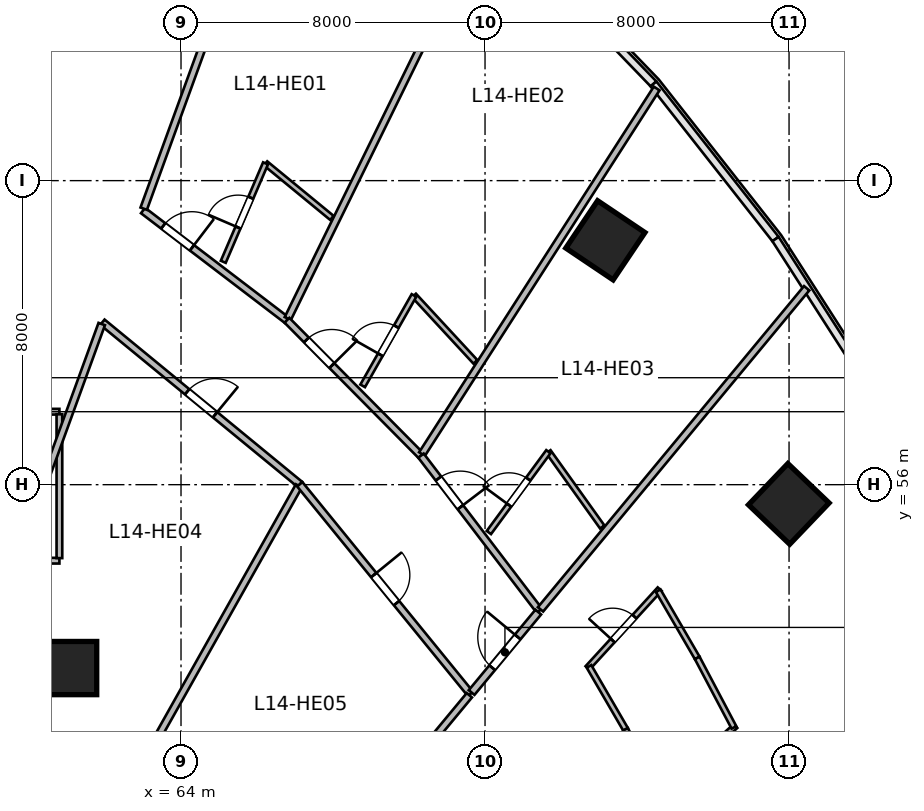
"""IFC4 building model, lengths in metres.
Left out: names, types, materials, properties, quantities, classifications, styles, units other than length and angle.
Written with IfcOpenShell. Run it as: python <this file> out.ifc"""

import sys

from ifc_helpers import new_model, si_unit, direction, frame, frame_2d, origin, origin_2d, place, context, subcontext, project, spatial, rectangle, circle, extrude, source, transform, mapped, element, fill, save


model = new_model("IFC4")
c1 = context("Model", 3, precision=1e-05, world=origin(), true_north=direction((0.0, 1.0)))
c2 = subcontext(c1, "Body", "Model", "MODEL_VIEW")
j1 = project(units=[si_unit("LENGTHUNIT", "METRE"), si_unit("PLANEANGLEUNIT", "RADIAN")], contexts=[c1])
p1 = place(None, origin())
s1 = spatial("IfcSite", under=j1, at=p1, CompositionType="ELEMENT")
p2 = place(p1, origin())
s2 = spatial("IfcBuilding", under=s1, at=p2, CompositionType="ELEMENT")
p3 = place(p2, frame((0.0, 0.0, 64.2)))
s3 = spatial("IfcBuildingStorey", under=s2, at=p3, CompositionType="ELEMENT", Elevation=64.2)
m1 = source(origin(), c2, "Body", "SweptSolid", [
    extrude(circle(Radius=0.7, at=origin_2d()), origin(), (0.0, 0.0, 1.0), 3.6),
])
p4 = place(p3, frame((61.082, 51.175, 0.0), z_axis=(0.0, 0.0, 1.0), x_axis=(0.409126902895, 0.912477494148, 0.0)))
e1 = element("IfcColumn", 1, at=p4, inside=s3, PredefinedType="COLUMN", context=c2, shape_type="MappedRepresentation", body=[
    mapped(m1, transform((0.0, 0.0, 0.0), scale=1.0)),
])
m2 = source(origin(), c2, "Body", "SweptSolid", [
    extrude(rectangle(XDim=1.5, YDim=1.5, at=origin_2d()), origin(), (0.0, 0.0, 1.0), 3.6),
])
for number, where, z_axis, x_axis in (
    (2, (75.167, 62.43, 0.0), (0.0, 0.0, 1.0), (0.558, 0.83, 0.0)),
    (3, (79.993, 55.494, 0.0), (0.0, 0.0, 1.0), (0.691, 0.723, 0.0)),
):
    element("IfcColumn", number, at=place(p3, frame(where, z_axis=z_axis, x_axis=x_axis)), inside=s3, PredefinedType="COLUMN", context=c2, shape_type="MappedRepresentation", body=[
        mapped(m2, transform((0.0, 0.0, 0.0), scale=1.0)),
    ])
m3 = source(origin(), c2, "Body", "SweptSolid", [
    extrude(rectangle(XDim=6.6, YDim=0.15, at=frame_2d((3.3, 0.0))), origin(), (0.0, 0.0, 1.0), 2.803),
])
p5 = place(p3, frame((54.2, 54.0, 0.0), z_axis=(0.0, 0.0, 1.0), x_axis=(1.0, 0.0, 0.0)))
e4 = element("IfcWall", 4, at=p5, inside=s3, PredefinedType="PARTITIONING", context=c2, shape_type="MappedRepresentation", body=[
    mapped(m3, transform((0.0, 0.0, 0.0), scale=1.0)),
])
m4 = source(origin(), c2, "Body", "SweptSolid", [
    extrude(rectangle(XDim=6.6, YDim=0.15, at=frame_2d((3.3, 0.0))), origin(), (0.0, 0.0, 1.0), 3.36),
])
p6 = place(p3, frame((54.2, 57.92, 0.0), z_axis=(0.0, 0.0, 1.0), x_axis=(1.0, 0.0, 0.0)))
e5 = element("IfcWall", 5, at=p6, inside=s3, PredefinedType="PARTITIONING", context=c2, shape_type="MappedRepresentation", body=[
    mapped(m4, transform((0.0, 0.0, 0.0), scale=1.0)),
])
p7 = place(p6, frame((2.825, 0.0, 0.0)))
e6 = element("IfcOpeningElement", 6, at=p7, cuts=e5, PredefinedType="OPENING", context=c2, shape_type="SweptSolid", body=[
    extrude(rectangle(XDim=0.95, YDim=2.1, at=frame_2d((0.475, 1.05))), frame((0.0, 0.085, 0.0), z_axis=(0.0, -1.0, 0.0), x_axis=(1.0, 0.0, 0.0)), (0.0, 0.0, 1.0), 0.17),
])
m5 = source(origin(), c2, "Body", "SweptSolid", [
    extrude(rectangle(XDim=3.785, YDim=0.15, at=frame_2d((1.893, 0.0))), origin(), (0.0, 0.0, 1.0), 3.36),
])
p8 = place(p3, frame((60.8, 54.067, 0.0), z_axis=(0.0, 0.0, 1.0), x_axis=(0.0, 1.0, 0.0)))
e7 = element("IfcWall", 7, at=p8, inside=s3, PredefinedType="PARTITIONING", context=c2, shape_type="MappedRepresentation", body=[
    mapped(m5, transform((0.0, 0.0, 0.0), scale=1.0)),
])
m6 = source(origin(), c2, "Body", "SweptSolid", [
    extrude(rectangle(XDim=4.762, YDim=0.18, at=frame_2d((2.381, 0.0))), origin(), (0.0, 0.0, 1.0), 3.36),
])
p9 = place(p3, frame((63.001, 63.214, 0.0), z_axis=(0.0, 0.0, 1.0), x_axis=(0.795070295872, -0.60651729128, 0.0)))
e8 = element("IfcWall", 8, at=p9, inside=s3, PredefinedType="PLUMBINGWALL", context=c2, shape_type="MappedRepresentation", body=[
    mapped(m6, transform((0.0, 0.0, 0.0), scale=1.0)),
])
p10 = place(p9, frame((0.668, 0.0, 0.0)))
e9 = element("IfcOpeningElement", 9, at=p10, cuts=e8, PredefinedType="OPENING", context=c2, shape_type="SweptSolid", body=[
    extrude(rectangle(XDim=0.95, YDim=2.15, at=frame_2d((0.475, 1.075))), frame((0.0, 0.1, 0.0), z_axis=(0.0, -1.0, 0.0), x_axis=(1.0, 0.0, 0.0)), (0.0, 0.0, 1.0), 0.2),
])
m7 = source(origin(), c2, "Body", "SweptSolid", [
    extrude(rectangle(XDim=12.088, YDim=0.18, at=frame_2d((6.044, 0.0))), origin(), (0.0, 0.0, 1.0), 3.36),
])
p11 = place(p3, frame((63.019, 63.262, 0.0), z_axis=(0.0, 0.0, 1.0), x_axis=(0.34203007529, 0.939689005787, 0.0)))
e10 = element("IfcWall", 10, at=p11, inside=s3, PredefinedType="PLUMBINGWALL", context=c2, shape_type="MappedRepresentation", body=[
    mapped(m7, transform((0.0, 0.0, 0.0), scale=1.0)),
])
m8 = source(origin(), c2, "Body", "SweptSolid", [
    extrude(rectangle(XDim=11.775, YDim=0.18, at=frame_2d((5.887, 0.0))), origin(), (0.0, 0.0, 1.0), 3.36),
])
p12 = place(p3, frame((66.81, 60.371, 0.0), z_axis=(0.0, 0.0, 1.0), x_axis=(0.4401500056, 0.897924257702, 0.0)))
e11 = element("IfcWall", 11, at=p12, inside=s3, PredefinedType="PLUMBINGWALL", context=c2, shape_type="MappedRepresentation", body=[
    mapped(m8, transform((0.0, 0.0, 0.0), scale=1.0)),
])
m9 = source(origin(), c2, "Body", "SweptSolid", [
    extrude(rectangle(XDim=2.26, YDim=0.14, at=frame_2d((1.13, 0.0))), origin(), (0.0, 0.0, 1.0), 3.36),
])
p13 = place(p3, frame((66.224, 64.455, 0.0), z_axis=(0.0, 0.0, 1.0), x_axis=(0.772646789219, -0.634836151388, 0.0)))
e12 = element("IfcWall", 12, at=p13, inside=s3, PredefinedType="PARTITIONING", context=c2, shape_type="MappedRepresentation", body=[
    mapped(m9, transform((0.0, 0.0, 0.0), scale=1.0)),
])
m10 = source(origin(), c2, "Body", "SweptSolid", [
    extrude(rectangle(XDim=2.819, YDim=0.14, at=frame_2d((1.409, 0.0))), origin(), (0.0, 0.0, 1.0), 3.36),
])
p14 = place(p3, frame((65.112, 61.864, 0.0), z_axis=(0.0, 0.0, 1.0), x_axis=(0.394420979357, 0.918929861874, 0.0)))
e13 = element("IfcWall", 13, at=p14, inside=s3, PredefinedType="PARTITIONING", context=c2, shape_type="MappedRepresentation", body=[
    mapped(m10, transform((0.0, 0.0, 0.0), scale=1.0)),
])
p15 = place(p14, frame((0.984, 0.0, 0.0)))
e14 = element("IfcOpeningElement", 14, at=p15, cuts=e13, PredefinedType="OPENING", context=c2, shape_type="SweptSolid", body=[
    extrude(rectangle(XDim=0.85, YDim=2.05, at=frame_2d((0.425, 1.025))), frame((0.0, 0.08, 0.0), z_axis=(0.0, -1.0, 0.0), x_axis=(1.0, 0.0, 0.0)), (0.0, 0.0, 1.0), 0.16),
])
m11 = source(origin(), c2, "Body", "SweptSolid", [
    extrude(rectangle(XDim=5.012, YDim=0.18, at=frame_2d((2.506, 0.0))), origin(), (0.0, 0.0, 1.0), 3.36),
])
p16 = place(p3, frame((66.788, 60.326, 0.0), z_axis=(0.0, 0.0, 1.0), x_axis=(0.703664626435, -0.710532260707, 0.0)))
e15 = element("IfcWall", 15, at=p16, inside=s3, PredefinedType="PLUMBINGWALL", context=c2, shape_type="MappedRepresentation", body=[
    mapped(m11, transform((0.0, 0.0, 0.0), scale=1.0)),
])
p17 = place(p16, frame((0.728, 0.0, 0.0)))
e16 = element("IfcOpeningElement", 16, at=p17, cuts=e15, PredefinedType="OPENING", context=c2, shape_type="SweptSolid", body=[
    extrude(rectangle(XDim=0.95, YDim=2.15, at=frame_2d((0.475, 1.075))), frame((0.0, 0.1, 0.0), z_axis=(0.0, -1.0, 0.0), x_axis=(1.0, 0.0, 0.0)), (0.0, 0.0, 1.0), 0.2),
])
m12 = source(origin(), c2, "Body", "SweptSolid", [
    extrude(rectangle(XDim=11.432, YDim=0.18, at=frame_2d((5.716, 0.0))), origin(), (0.0, 0.0, 1.0), 3.36),
])
p18 = place(p3, frame((70.341, 56.805, 0.0), z_axis=(0.0, 0.0, 1.0), x_axis=(0.540196183124, 0.841539115988, 0.0)))
e17 = element("IfcWall", 17, at=p18, inside=s3, PredefinedType="PLUMBINGWALL", context=c2, shape_type="MappedRepresentation", body=[
    mapped(m12, transform((0.0, 0.0, 0.0), scale=1.0)),
])
m13 = source(origin(), c2, "Body", "SweptSolid", [
    extrude(rectangle(XDim=2.38, YDim=0.14, at=frame_2d((1.19, 0.0))), origin(), (0.0, 0.0, 1.0), 3.36),
])
p19 = place(p3, frame((70.131, 60.979, 0.0), z_axis=(0.0, 0.0, 1.0), x_axis=(0.679084816758, -0.734059814762, 0.0)))
e18 = element("IfcWall", 18, at=p19, inside=s3, PredefinedType="PARTITIONING", context=c2, shape_type="MappedRepresentation", body=[
    mapped(m13, transform((0.0, 0.0, 0.0), scale=1.0)),
])
m14 = source(origin(), c2, "Body", "SweptSolid", [
    extrude(rectangle(XDim=2.735, YDim=0.14, at=frame_2d((1.367, 0.0))), origin(), (0.0, 0.0, 1.0), 3.36),
])
p20 = place(p3, frame((68.781, 58.6, 0.0), z_axis=(0.0, 0.0, 1.0), x_axis=(0.493694940578, 0.869635156631, 0.0)))
e19 = element("IfcWall", 19, at=p20, inside=s3, PredefinedType="PARTITIONING", context=c2, shape_type="MappedRepresentation", body=[
    mapped(m14, transform((0.0, 0.0, 0.0), scale=1.0)),
])
p21 = place(p20, frame((0.942, 0.0, 0.0)))
e20 = element("IfcOpeningElement", 20, at=p21, cuts=e19, PredefinedType="OPENING", context=c2, shape_type="SweptSolid", body=[
    extrude(rectangle(XDim=0.85, YDim=2.05, at=frame_2d((0.425, 1.025))), frame((0.0, 0.08, 0.0), z_axis=(0.0, -1.0, 0.0), x_axis=(1.0, 0.0, 0.0)), (0.0, 0.0, 1.0), 0.16),
])
m15 = source(origin(), c2, "Body", "SweptSolid", [
    extrude(rectangle(XDim=5.135, YDim=0.18, at=frame_2d((2.567, 0.0))), origin(), (0.0, 0.0, 1.0), 3.36),
])
p22 = place(p3, frame((70.315, 56.764, 0.0), z_axis=(0.0, 0.0, 1.0), x_axis=(0.606802199649, -0.794852873494, 0.0)))
e21 = element("IfcWall", 21, at=p22, inside=s3, PredefinedType="PLUMBINGWALL", context=c2, shape_type="MappedRepresentation", body=[
    mapped(m15, transform((0.0, 0.0, 0.0), scale=1.0)),
])
p23 = place(p22, frame((0.757, 0.0, 0.0)))
e22 = element("IfcOpeningElement", 22, at=p23, cuts=e21, PredefinedType="OPENING", context=c2, shape_type="SweptSolid", body=[
    extrude(rectangle(XDim=0.95, YDim=2.15, at=frame_2d((0.475, 1.075))), frame((0.0, 0.1, 0.0), z_axis=(0.0, -1.0, 0.0), x_axis=(1.0, 0.0, 0.0)), (0.0, 0.0, 1.0), 0.2),
])
m16 = source(origin(), c2, "Body", "SweptSolid", [
    extrude(rectangle(XDim=10.975, YDim=0.18, at=frame_2d((5.487, 0.0))), origin(), (0.0, 0.0, 1.0), 3.36),
])
p24 = place(p3, frame((73.46, 52.719, 0.0), z_axis=(0.0, 0.0, 1.0), x_axis=(0.638125265812, 0.769932558821, 0.0)))
e23 = element("IfcWall", 23, at=p24, inside=s3, PredefinedType="PLUMBINGWALL", context=c2, shape_type="MappedRepresentation", body=[
    mapped(m16, transform((0.0, 0.0, 0.0), scale=1.0)),
])
m17 = source(origin(), c2, "Body", "SweptSolid", [
    extrude(rectangle(XDim=2.437, YDim=0.14, at=frame_2d((1.218, 0.0))), origin(), (0.0, 0.0, 1.0), 3.36),
])
p25 = place(p3, frame((73.667, 56.868, 0.0), z_axis=(0.0, 0.0, 1.0), x_axis=(0.581797219134, -0.813333877204, 0.0)))
e24 = element("IfcWall", 24, at=p25, inside=s3, PredefinedType="PARTITIONING", context=c2, shape_type="MappedRepresentation", body=[
    mapped(m17, transform((0.0, 0.0, 0.0), scale=1.0)),
])
m18 = source(origin(), c2, "Body", "SweptSolid", [
    extrude(rectangle(XDim=2.642, YDim=0.14, at=frame_2d((1.321, 0.0))), origin(), (0.0, 0.0, 1.0), 3.36),
])
p26 = place(p3, frame((72.101, 54.741, 0.0), z_axis=(0.0, 0.0, 1.0), x_axis=(0.592789122423, 0.805357719487, 0.0)))
e25 = element("IfcWall", 25, at=p26, inside=s3, PredefinedType="PARTITIONING", context=c2, shape_type="MappedRepresentation", body=[
    mapped(m18, transform((0.0, 0.0, 0.0), scale=1.0)),
])
p27 = place(p26, frame((0.896, 0.0, 0.0)))
e26 = element("IfcOpeningElement", 26, at=p27, cuts=e25, PredefinedType="OPENING", context=c2, shape_type="SweptSolid", body=[
    extrude(rectangle(XDim=0.85, YDim=2.05, at=frame_2d((0.425, 1.025))), frame((0.0, 0.08, 0.0), z_axis=(0.0, -1.0, 0.0), x_axis=(1.0, 0.0, 0.0)), (0.0, 0.0, 1.0), 0.16),
])
m19 = source(origin(), c2, "Body", "SweptSolid", [
    extrude(rectangle(XDim=6.721, YDim=0.18, at=frame_2d((3.361, 0.0))), origin(), (0.0, 0.0, 1.0), 3.36),
])
p28 = place(p3, frame((61.931, 60.275, 0.0), z_axis=(0.0, 0.0, 1.0), x_axis=(0.772828051199, -0.63461547671, 0.0)))
e27 = element("IfcWall", 27, at=p28, inside=s3, PredefinedType="PLUMBINGWALL", context=c2, shape_type="MappedRepresentation", body=[
    mapped(m19, transform((0.0, 0.0, 0.0), scale=1.0)),
])
p29 = place(p28, frame((2.885, 0.0, 0.0)))
e28 = element("IfcOpeningElement", 28, at=p29, cuts=e27, PredefinedType="OPENING", context=c2, shape_type="SweptSolid", body=[
    extrude(rectangle(XDim=0.95, YDim=2.15, at=frame_2d((0.475, 1.075))), frame((0.0, 0.1, 0.0), z_axis=(0.0, -1.0, 0.0), x_axis=(1.0, 0.0, 0.0)), (0.0, 0.0, 1.0), 0.2),
])
m20 = source(origin(), c2, "Body", "SweptSolid", [
    extrude(rectangle(XDim=12.196, YDim=0.18, at=frame_2d((6.098, 0.0))), origin(), (0.0, 0.0, 1.0), 3.36),
])
p30 = place(p3, frame((57.742, 48.766, 0.0), z_axis=(0.0, 0.0, 1.0), x_axis=(0.342022711534, 0.939691686031, 0.0)))
e29 = element("IfcWall", 29, at=p30, inside=s3, PredefinedType="PLUMBINGWALL", context=c2, shape_type="MappedRepresentation", body=[
    mapped(m20, transform((0.0, 0.0, 0.0), scale=1.0)),
])
m21 = source(origin(), c2, "Body", "SweptSolid", [
    extrude(rectangle(XDim=11.67, YDim=0.18, at=frame_2d((5.835, 0.0))), origin(), (0.0, 0.0, 1.0), 3.36),
])
p31 = place(p3, frame((61.381, 45.795, 0.0), z_axis=(0.0, 0.0, 1.0), x_axis=(0.490156946222, 0.871634193954, 0.0)))
e30 = element("IfcWall", 30, at=p31, inside=s3, PredefinedType="PLUMBINGWALL", context=c2, shape_type="MappedRepresentation", body=[
    mapped(m21, transform((0.0, 0.0, 0.0), scale=1.0)),
])
m22 = source(origin(), c2, "Body", "SweptSolid", [
    extrude(rectangle(XDim=7.113, YDim=0.18, at=frame_2d((3.556, 0.0))), origin(), (0.0, 0.0, 1.0), 3.36),
])
p32 = place(p3, frame((67.126, 56.01, 0.0), z_axis=(0.0, 0.0, 1.0), x_axis=(0.63149032532, -0.775383755974, 0.0)))
e31 = element("IfcWall", 31, at=p32, inside=s3, PredefinedType="PLUMBINGWALL", context=c2, shape_type="MappedRepresentation", body=[
    mapped(m22, transform((0.0, 0.0, 0.0), scale=1.0)),
])
p33 = place(p32, frame((3.081, 0.0, 0.0)))
e32 = element("IfcOpeningElement", 32, at=p33, cuts=e31, PredefinedType="OPENING", context=c2, shape_type="SweptSolid", body=[
    extrude(rectangle(XDim=0.95, YDim=2.15, at=frame_2d((0.475, 1.075))), frame((0.0, 0.1, 0.0), z_axis=(0.0, -1.0, 0.0), x_axis=(1.0, 0.0, 0.0)), (0.0, 0.0, 1.0), 0.2),
])
m23 = source(origin(), c2, "Body", "SweptSolid", [
    extrude(rectangle(XDim=11.053, YDim=0.18, at=frame_2d((5.527, 0.0))), origin(), (0.0, 0.0, 1.0), 3.36),
])
p34 = place(p3, frame((64.534, 41.949, 0.0), z_axis=(0.0, 0.0, 1.0), x_axis=(0.638131235571, 0.769927611005, 0.0)))
e33 = element("IfcWall", 33, at=p34, inside=s3, PredefinedType="PLUMBINGWALL", context=c2, shape_type="MappedRepresentation", body=[
    mapped(m23, transform((0.0, 0.0, 0.0), scale=1.0)),
])
m24 = source(origin(), c2, "Body", "SweptSolid", [
    extrude(rectangle(XDim=2.748, YDim=0.195, at=frame_2d((1.374, 0.0))), origin(), (0.0, 0.0, 1.0), 3.36),
])
p35 = place(p3, frame((71.647, 50.531, 0.0), z_axis=(0.0, 0.0, 1.0), x_axis=(0.638111168284, 0.769944242729, 0.0)))
e34 = element("IfcWall", 34, at=p35, inside=s3, PredefinedType="PARTITIONING", context=c2, shape_type="MappedRepresentation", body=[
    mapped(m24, transform((0.0, 0.0, 0.0), scale=1.0)),
])
p36 = place(p35, frame((0.849, 0.0, 0.0)))
e35 = element("IfcOpeningElement", 35, at=p36, cuts=e34, PredefinedType="OPENING", context=c2, shape_type="SweptSolid", body=[
    extrude(rectangle(XDim=1.05, YDim=2.15, at=frame_2d((0.525, 1.075))), frame((0.0, 0.107, 0.0), z_axis=(0.0, -1.0, 0.0), x_axis=(1.0, 0.0, 0.0)), (0.0, 0.0, 1.0), 0.215),
])
m25 = source(origin(), c2, "Body", "SweptSolid", [
    extrude(rectangle(XDim=2.812, YDim=0.14, at=frame_2d((1.406, 0.0))), origin(), (0.0, 0.0, 1.0), 3.36),
])
p37 = place(p3, frame((74.697, 51.177, 0.0), z_axis=(0.0, 0.0, 1.0), x_axis=(0.675119025852, 0.737708818527, 0.0)))
e36 = element("IfcWall", 36, at=p37, inside=s3, PredefinedType="PARTITIONING", context=c2, shape_type="MappedRepresentation", body=[
    mapped(m25, transform((0.0, 0.0, 0.0), scale=1.0)),
])
p38 = place(p37, frame((0.981, 0.0, 0.0)))
e37 = element("IfcOpeningElement", 37, at=p38, cuts=e36, PredefinedType="OPENING", context=c2, shape_type="SweptSolid", body=[
    extrude(rectangle(XDim=0.85, YDim=2.05, at=frame_2d((0.425, 1.025))), frame((0.0, 0.08, 0.0), z_axis=(0.0, -1.0, 0.0), x_axis=(1.0, 0.0, 0.0)), (0.0, 0.0, 1.0), 0.16),
])
m26 = source(origin(), c2, "Body", "SweptSolid", [
    extrude(rectangle(XDim=2.738, YDim=0.14, at=frame_2d((1.369, 0.0))), origin(), (0.0, 0.0, 1.0), 3.36),
])
p39 = place(p3, frame((76.56, 47.814, 0.0), z_axis=(0.0, 0.0, 1.0), x_axis=(0.741873676582, 0.670539669218, 0.0)))
e38 = element("IfcWall", 38, at=p39, inside=s3, PredefinedType="PARTITIONING", context=c2, shape_type="MappedRepresentation", body=[
    mapped(m26, transform((0.0, 0.0, 0.0), scale=1.0)),
])
m27 = source(origin(), c2, "Body", "SweptSolid", [
    extrude(rectangle(XDim=1.914, YDim=0.14, at=frame_2d((0.957, 0.0))), origin(), (0.0, 0.0, 1.0), 3.36),
])
p40 = place(p3, frame((74.736, 51.219, 0.0), z_axis=(0.0, 0.0, 1.0), x_axis=(0.502347790612, -0.864665656347, 0.0)))
e39 = element("IfcWall", 39, at=p40, inside=s3, PredefinedType="PARTITIONING", context=c2, shape_type="MappedRepresentation", body=[
    mapped(m27, transform((0.0, 0.0, 0.0), scale=1.0)),
])
m28 = source(origin(), c2, "Body", "SweptSolid", [
    extrude(rectangle(XDim=2.045, YDim=0.14, at=frame_2d((1.022, 0.0))), origin(), (0.0, 0.0, 1.0), 3.36),
])
p41 = place(p3, frame((76.557, 53.209, 0.0), z_axis=(0.0, 0.0, 1.0), x_axis=(0.5023112139, -0.864686905411, 0.0)))
e40 = element("IfcWall", 40, at=p41, inside=s3, PredefinedType="PARTITIONING", context=c2, shape_type="MappedRepresentation", body=[
    mapped(m28, transform((0.0, 0.0, 0.0), scale=1.0)),
])
m29 = source(origin(), c2, "Body", "SweptSolid", [
    extrude(rectangle(XDim=1.936, YDim=0.14, at=frame_2d((0.968, 0.0))), origin(), (0.0, 0.0, 1.0), 3.36),
])
p42 = place(p3, frame((75.697, 49.563, 0.0), z_axis=(0.0, 0.0, 1.0), x_axis=(0.467174971862, -0.884164886017, 0.0)))
e41 = element("IfcWall", 41, at=p42, inside=s3, PredefinedType="PARTITIONING", context=c2, shape_type="MappedRepresentation", body=[
    mapped(m29, transform((0.0, 0.0, 0.0), scale=1.0)),
])
m30 = source(origin(), c2, "Body", "SweptSolid", [
    extrude(rectangle(XDim=2.068, YDim=0.14, at=frame_2d((1.034, 0.0))), origin(), (0.0, 0.0, 1.0), 3.36),
])
p43 = place(p3, frame((77.584, 51.441, 0.0), z_axis=(0.0, 0.0, 1.0), x_axis=(0.467215057643, -0.884143704333, 0.0)))
e42 = element("IfcWall", 42, at=p43, inside=s3, PredefinedType="PARTITIONING", context=c2, shape_type="MappedRepresentation", body=[
    mapped(m30, transform((0.0, 0.0, 0.0), scale=1.0)),
])
m31 = source(origin(), c2, "Body", "SweptSolid", [
    extrude(rectangle(XDim=0.95, YDim=2.15, at=frame_2d((0.475, 1.075))), frame((0.0, 0.025, 0.0), z_axis=(0.0, -1.0, 0.0), x_axis=(1.0, 0.0, 0.0)), (0.0, 0.0, 1.0), 0.05),
])
p44 = place(p10, origin())
e43 = element("IfcDoor", 43, at=p44, inside=s3, OperationType="SINGLE_SWING_RIGHT", PredefinedType="DOOR", context=c2, shape_type="MappedRepresentation", body=[
    mapped(m31, transform((0.0, 0.0, 0.0), scale=1.0)),
])
fill(e9, e43)
m32 = source(origin(), c2, "Body", "SweptSolid", [
    extrude(rectangle(XDim=0.85, YDim=2.05, at=frame_2d((0.425, 1.025))), frame((0.0, 0.025, 0.0), z_axis=(0.0, -1.0, 0.0), x_axis=(1.0, 0.0, 0.0)), (0.0, 0.0, 1.0), 0.05),
])
p45 = place(p15, origin())
e44 = element("IfcDoor", 44, at=p45, inside=s3, OperationType="SINGLE_SWING_LEFT", PredefinedType="DOOR", context=c2, shape_type="MappedRepresentation", body=[
    mapped(m32, transform((0.0, 0.0, 0.0), scale=1.0)),
])
fill(e14, e44)
p46 = place(p17, origin())
e45 = element("IfcDoor", 45, at=p46, inside=s3, OperationType="SINGLE_SWING_RIGHT", PredefinedType="DOOR", context=c2, shape_type="MappedRepresentation", body=[
    mapped(m31, transform((0.0, 0.0, 0.0), scale=1.0)),
])
fill(e16, e45)
p47 = place(p21, origin())
e46 = element("IfcDoor", 46, at=p47, inside=s3, OperationType="SINGLE_SWING_LEFT", PredefinedType="DOOR", context=c2, shape_type="MappedRepresentation", body=[
    mapped(m32, transform((0.0, 0.0, 0.0), scale=1.0)),
])
fill(e20, e46)
p48 = place(p23, origin())
e47 = element("IfcDoor", 47, at=p48, inside=s3, OperationType="SINGLE_SWING_RIGHT", PredefinedType="DOOR", context=c2, shape_type="MappedRepresentation", body=[
    mapped(m31, transform((0.0, 0.0, 0.0), scale=1.0)),
])
fill(e22, e47)
p49 = place(p27, origin())
e48 = element("IfcDoor", 48, at=p49, inside=s3, OperationType="SINGLE_SWING_LEFT", PredefinedType="DOOR", context=c2, shape_type="MappedRepresentation", body=[
    mapped(m32, transform((0.0, 0.0, 0.0), scale=1.0)),
])
fill(e26, e48)
p50 = place(p29, origin())
e49 = element("IfcDoor", 49, at=p50, inside=s3, OperationType="SINGLE_SWING_RIGHT", PredefinedType="DOOR", context=c2, shape_type="MappedRepresentation", body=[
    mapped(m31, transform((0.0, 0.0, 0.0), scale=1.0)),
])
fill(e28, e49)
p51 = place(p33, origin())
e50 = element("IfcDoor", 50, at=p51, inside=s3, OperationType="SINGLE_SWING_LEFT", PredefinedType="DOOR", context=c2, shape_type="MappedRepresentation", body=[
    mapped(m31, transform((0.0, 0.0, 0.0), scale=1.0)),
])
fill(e32, e50)
m33 = source(origin(), c2, "Body", "SweptSolid", [
    extrude(rectangle(XDim=1.05, YDim=2.15, at=frame_2d((0.525, 1.075))), frame((0.0, 0.025, 0.0), z_axis=(0.0, -1.0, 0.0), x_axis=(1.0, 0.0, 0.0)), (0.0, 0.0, 1.0), 0.05),
])
p52 = place(p36, origin())
e51 = element("IfcDoor", 51, at=p52, inside=s3, OperationType="SINGLE_SWING_RIGHT", PredefinedType="DOOR", context=c2, shape_type="MappedRepresentation", body=[
    mapped(m33, transform((0.0, 0.0, 0.0), scale=1.0)),
])
fill(e35, e51)
p53 = place(p38, origin())
e52 = element("IfcDoor", 52, at=p53, inside=s3, OperationType="SINGLE_SWING_LEFT", PredefinedType="DOOR", context=c2, shape_type="MappedRepresentation", body=[
    mapped(m32, transform((0.0, 0.0, 0.0), scale=1.0)),
])
fill(e37, e52)
save(model, sys.argv[1])
